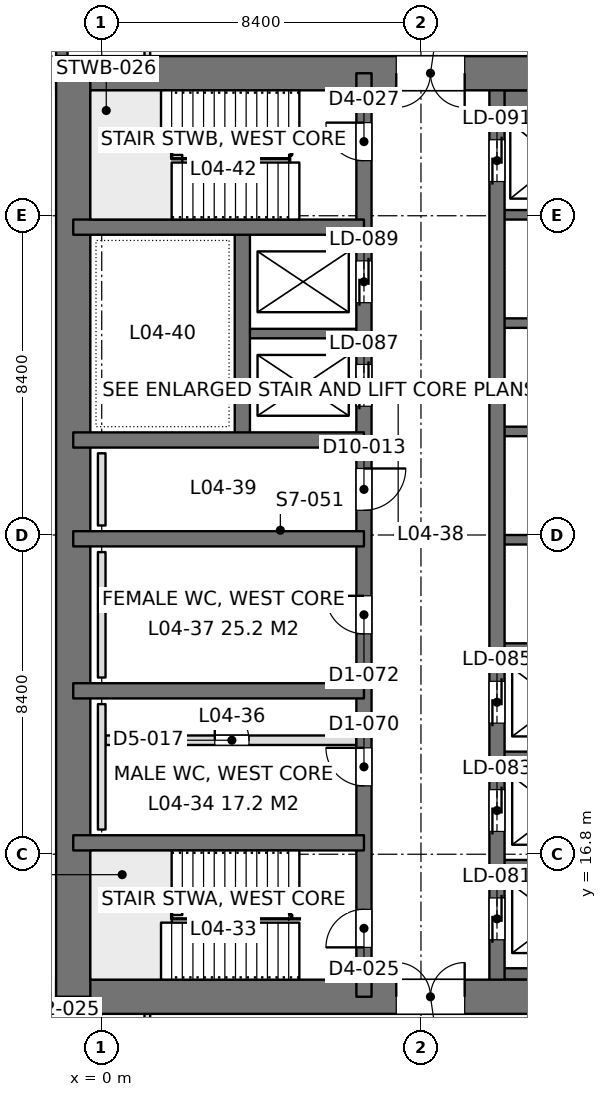
"""IFC4 building model, lengths in metres.
Left out: names, types, materials, properties, quantities, classifications, styles, units other than length and angle.
Written with IfcOpenShell. Run it as: python <this file> out.ifc"""

import sys

from ifc_helpers import new_model, si_unit, direction, frame, frame_2d, origin, place, context, subcontext, project, spatial, rectangle, extrude, element, fill, save


model = new_model("IFC4")
c1 = context("Model", 3, precision=1e-05, world=origin(), true_north=direction((0.0, 1.0)))
c2 = subcontext(c1, "Body", "Model", "MODEL_VIEW")
j1 = project(units=[si_unit("LENGTHUNIT", "METRE"), si_unit("PLANEANGLEUNIT", "RADIAN")], contexts=[c1])
p1 = place(None, origin())
s1 = spatial("IfcSite", under=j1, at=p1, CompositionType="ELEMENT")
p2 = place(p1, origin())
s2 = spatial("IfcBuilding", under=s1, at=p2, CompositionType="ELEMENT")
p3 = place(p2, frame((0.0, 0.0, 18.9)))
s3 = spatial("IfcBuildingStorey", under=s2, at=p3, CompositionType="ELEMENT", Elevation=18.9)
p4 = place(p3, frame((-1.2, 13.05, 0.0), z_axis=(0.0, 0.0, 1.0), x_axis=(1.0, 0.0, 0.0)))
e1 = element("IfcWall", 1, at=p4, inside=s3, PredefinedType="SHEAR", context=c2, shape_type="SweptSolid", body=[
    extrude(rectangle(XDim=18.0, YDim=0.9, at=frame_2d((9.0, 0.0))), origin(), (0.0, 0.0, 1.0), 4.5),
])
p5 = place(p4, frame((8.95, 0.0, 0.0)))
e2 = element("IfcOpeningElement", 2, at=p5, cuts=e1, PredefinedType="OPENING", context=c2, shape_type="SweptSolid", body=[
    extrude(rectangle(XDim=1.8, YDim=2.4, at=frame_2d((0.9, 1.2))), frame((0.0, 0.46, 0.0), z_axis=(0.0, -1.0, 0.0), x_axis=(1.0, 0.0, 0.0)), (0.0, 0.0, 1.0), 0.92),
])
p6 = place(p3, frame((-1.2, 37.35, 0.0), z_axis=(0.0, 0.0, 1.0), x_axis=(1.0, 0.0, 0.0)))
e3 = element("IfcWall", 3, at=p6, inside=s3, PredefinedType="SHEAR", context=c2, shape_type="SweptSolid", body=[
    extrude(rectangle(XDim=18.0, YDim=0.9, at=frame_2d((9.0, 0.0))), origin(), (0.0, 0.0, 1.0), 4.5),
])
p7 = place(p6, frame((8.95, 0.0, 0.0)))
e4 = element("IfcOpeningElement", 4, at=p7, cuts=e3, PredefinedType="OPENING", context=c2, shape_type="SweptSolid", body=[
    extrude(rectangle(XDim=1.8, YDim=2.4, at=frame_2d((0.9, 1.2))), frame((0.0, 0.46, 0.0), z_axis=(0.0, -1.0, 0.0), x_axis=(1.0, 0.0, 0.0)), (0.0, 0.0, 1.0), 0.92),
])
p8 = place(p3, frame((-0.75, 13.05, 0.0), z_axis=(0.0, 0.0, 1.0), x_axis=(0.0, 1.0, 0.0)))
e5 = element("IfcWall", 5, at=p8, inside=s3, PredefinedType="SHEAR", context=c2, shape_type="SweptSolid", body=[
    extrude(rectangle(XDim=24.3, YDim=0.9, at=frame_2d((12.15, 0.0))), origin(), (0.0, 0.0, 1.0), 4.5),
])
p9 = place(p3, frame((6.9, 13.05, 0.0), z_axis=(0.0, 0.0, 1.0), x_axis=(0.0, 1.0, 0.0)))
e6 = element("IfcWall", 6, at=p9, inside=s3, PredefinedType="SHEAR", context=c2, shape_type="SweptSolid", body=[
    extrude(rectangle(XDim=24.3, YDim=0.4, at=frame_2d((12.15, 0.0))), origin(), (0.0, 0.0, 1.0), 4.5),
])
p10 = place(p9, frame((1.3, 0.0, 0.0)))
e7 = element("IfcOpeningElement", 7, at=p10, cuts=e6, PredefinedType="OPENING", context=c2, shape_type="SweptSolid", body=[
    extrude(rectangle(XDim=1.0, YDim=2.2, at=frame_2d((0.5, 1.1))), frame((0.0, 0.21, 0.0), z_axis=(0.0, -1.0, 0.0), x_axis=(1.0, 0.0, 0.0)), (0.0, 0.0, 1.0), 0.42),
])
p11 = place(p9, frame((22.0, 0.0, 0.0)))
e8 = element("IfcOpeningElement", 8, at=p11, cuts=e6, PredefinedType="OPENING", context=c2, shape_type="SweptSolid", body=[
    extrude(rectangle(XDim=1.0, YDim=2.2, at=frame_2d((0.5, 1.1))), frame((0.0, 0.21, 0.0), z_axis=(0.0, -1.0, 0.0), x_axis=(1.0, 0.0, 0.0)), (0.0, 0.0, 1.0), 0.42),
])
p12 = place(p9, frame((5.55, 0.0, 0.0)))
e9 = element("IfcOpeningElement", 9, at=p12, cuts=e6, PredefinedType="OPENING", context=c2, shape_type="SweptSolid", body=[
    extrude(rectangle(XDim=1.0, YDim=2.2, at=frame_2d((0.5, 1.1))), frame((0.0, 0.21, 0.0), z_axis=(0.0, -1.0, 0.0), x_axis=(1.0, 0.0, 0.0)), (0.0, 0.0, 1.0), 0.42),
])
p13 = place(p9, frame((9.55, 0.0, 0.0)))
e10 = element("IfcOpeningElement", 10, at=p13, cuts=e6, PredefinedType="OPENING", context=c2, shape_type="SweptSolid", body=[
    extrude(rectangle(XDim=1.0, YDim=2.2, at=frame_2d((0.5, 1.1))), frame((0.0, 0.21, 0.0), z_axis=(0.0, -1.0, 0.0), x_axis=(1.0, 0.0, 0.0)), (0.0, 0.0, 1.0), 0.42),
])
p14 = place(p9, frame((12.8, 0.0, 0.0)))
e11 = element("IfcOpeningElement", 11, at=p14, cuts=e6, PredefinedType="OPENING", context=c2, shape_type="SweptSolid", body=[
    extrude(rectangle(XDim=1.1, YDim=2.2, at=frame_2d((0.55, 1.1))), frame((0.0, 0.21, 0.0), z_axis=(0.0, -1.0, 0.0), x_axis=(1.0, 0.0, 0.0)), (0.0, 0.0, 1.0), 0.42),
])
p15 = place(p9, frame((15.538, 0.0, 0.0)))
e12 = element("IfcOpeningElement", 12, at=p15, cuts=e6, PredefinedType="OPENING", context=c2, shape_type="SweptSolid", body=[
    extrude(rectangle(XDim=1.1, YDim=2.2, at=frame_2d((0.55, 1.1))), frame((0.0, 0.21, 0.0), z_axis=(0.0, -1.0, 0.0), x_axis=(1.0, 0.0, 0.0)), (0.0, 0.0, 1.0), 0.42),
])
p16 = place(p9, frame((18.262, 0.0, 0.0)))
e13 = element("IfcOpeningElement", 13, at=p16, cuts=e6, PredefinedType="OPENING", context=c2, shape_type="SweptSolid", body=[
    extrude(rectangle(XDim=1.1, YDim=2.2, at=frame_2d((0.55, 1.1))), frame((0.0, 0.21, 0.0), z_axis=(0.0, -1.0, 0.0), x_axis=(1.0, 0.0, 0.0)), (0.0, 0.0, 1.0), 0.42),
])
p17 = place(p3, frame((10.4, 13.05, 0.0), z_axis=(0.0, 0.0, 1.0), x_axis=(0.0, 1.0, 0.0)))
e14 = element("IfcWall", 14, at=p17, inside=s3, PredefinedType="SHEAR", context=c2, shape_type="SweptSolid", body=[
    extrude(rectangle(XDim=24.3, YDim=0.4, at=frame_2d((12.15, 0.0))), origin(), (0.0, 0.0, 1.0), 4.5),
])
p18 = place(p17, frame((1.5, 0.0, 0.0)))
e15 = element("IfcOpeningElement", 15, at=p18, cuts=e14, PredefinedType="OPENING", context=c2, shape_type="SweptSolid", body=[
    extrude(rectangle(XDim=1.1, YDim=2.2, at=frame_2d((0.55, 1.1))), frame((0.0, 0.21, 0.0), z_axis=(0.0, -1.0, 0.0), x_axis=(1.0, 0.0, 0.0)), (0.0, 0.0, 1.0), 0.42),
])
p19 = place(p17, frame((4.35, 0.0, 0.0)))
e16 = element("IfcOpeningElement", 16, at=p19, cuts=e14, PredefinedType="OPENING", context=c2, shape_type="SweptSolid", body=[
    extrude(rectangle(XDim=1.1, YDim=2.2, at=frame_2d((0.55, 1.1))), frame((0.0, 0.21, 0.0), z_axis=(0.0, -1.0, 0.0), x_axis=(1.0, 0.0, 0.0)), (0.0, 0.0, 1.0), 0.42),
])
p20 = place(p17, frame((7.2, 0.0, 0.0)))
e17 = element("IfcOpeningElement", 17, at=p20, cuts=e14, PredefinedType="OPENING", context=c2, shape_type="SweptSolid", body=[
    extrude(rectangle(XDim=1.1, YDim=2.2, at=frame_2d((0.55, 1.1))), frame((0.0, 0.21, 0.0), z_axis=(0.0, -1.0, 0.0), x_axis=(1.0, 0.0, 0.0)), (0.0, 0.0, 1.0), 0.42),
])
p21 = place(p17, frame((21.45, 0.0, 0.0)))
e18 = element("IfcOpeningElement", 18, at=p21, cuts=e14, PredefinedType="OPENING", context=c2, shape_type="SweptSolid", body=[
    extrude(rectangle(XDim=1.1, YDim=2.2, at=frame_2d((0.55, 1.1))), frame((0.0, 0.21, 0.0), z_axis=(0.0, -1.0, 0.0), x_axis=(1.0, 0.0, 0.0)), (0.0, 0.0, 1.0), 0.42),
])
for number, where, z_axis, x_axis in (
    (19, (-0.75, 17.1, 0.0), (0.0, 0.0, 1.0), (1.0, 0.0, 0.0)),
    (20, (-0.75, 21.1, 0.0), (0.0, 0.0, 1.0), (1.0, 0.0, 0.0)),
    (21, (-0.75, 25.1, 0.0), (0.0, 0.0, 1.0), (1.0, 0.0, 0.0)),
    (22, (-0.75, 27.7, 0.0), (0.0, 0.0, 1.0), (1.0, 0.0, 0.0)),
    (23, (-0.75, 33.3, 0.0), (0.0, 0.0, 1.0), (1.0, 0.0, 0.0)),
):
    element("IfcWall", number, at=place(p3, frame(where, z_axis=z_axis, x_axis=x_axis)), inside=s3, PredefinedType="SHEAR", context=c2, shape_type="SweptSolid", body=[
        extrude(rectangle(XDim=7.65, YDim=0.4, at=frame_2d((3.825, 0.0))), origin(), (0.0, 0.0, 1.0), 4.5),
    ])
p22 = place(p3, frame((3.7, 27.7, 0.0), z_axis=(0.0, 0.0, 1.0), x_axis=(0.0, 1.0, 0.0)))
e24 = element("IfcWall", 24, at=p22, inside=s3, PredefinedType="SHEAR", context=c2, shape_type="SweptSolid", body=[
    extrude(rectangle(XDim=5.6, YDim=0.4, at=frame_2d((2.8, 0.0))), origin(), (0.0, 0.0, 1.0), 4.5),
])
p23 = place(p3, frame((3.7, 30.5, 0.0), z_axis=(0.0, 0.0, 1.0), x_axis=(1.0, 0.0, 0.0)))
e25 = element("IfcWall", 25, at=p23, inside=s3, PredefinedType="SHEAR", context=c2, shape_type="SweptSolid", body=[
    extrude(rectangle(XDim=3.2, YDim=0.25, at=frame_2d((1.6, 0.0))), origin(), (0.0, 0.0, 1.0), 4.5),
])
p24 = place(p3, frame((10.4, 13.65, 0.0), z_axis=(0.0, 0.0, 1.0), x_axis=(1.0, 0.0, 0.0)))
e26 = element("IfcWall", 26, at=p24, inside=s3, PredefinedType="SHEAR", context=c2, shape_type="SweptSolid", body=[
    extrude(rectangle(XDim=3.2, YDim=0.3, at=frame_2d((1.6, 0.0))), origin(), (0.0, 0.0, 1.0), 4.5),
])
for number, where, z_axis, x_axis in (
    (27, (10.4, 16.525, 0.0), (0.0, 0.0, 1.0), (1.0, 0.0, 0.0)),
    (28, (10.4, 19.375, 0.0), (0.0, 0.0, 1.0), (1.0, 0.0, 0.0)),
    (29, (10.4, 22.225, 0.0), (0.0, 0.0, 1.0), (1.0, 0.0, 0.0)),
    (30, (10.4, 25.075, 0.0), (0.0, 0.0, 1.0), (1.0, 0.0, 0.0)),
    (31, (10.4, 27.925, 0.0), (0.0, 0.0, 1.0), (1.0, 0.0, 0.0)),
    (32, (10.4, 30.775, 0.0), (0.0, 0.0, 1.0), (1.0, 0.0, 0.0)),
    (33, (10.4, 33.625, 0.0), (0.0, 0.0, 1.0), (1.0, 0.0, 0.0)),
):
    element("IfcWall", number, at=place(p3, frame(where, z_axis=z_axis, x_axis=x_axis)), inside=s3, PredefinedType="SHEAR", context=c2, shape_type="SweptSolid", body=[
        extrude(rectangle(XDim=3.2, YDim=0.25, at=frame_2d((1.6, 0.0))), origin(), (0.0, 0.0, 1.0), 4.5),
    ])
p25 = place(p3, frame((10.4, 36.625, 0.0), z_axis=(0.0, 0.0, 1.0), x_axis=(1.0, 0.0, 0.0)))
e34 = element("IfcWall", 34, at=p25, inside=s3, PredefinedType="SHEAR", context=c2, shape_type="SweptSolid", body=[
    extrude(rectangle(XDim=3.2, YDim=0.55, at=frame_2d((1.6, 0.0))), origin(), (0.0, 0.0, 1.0), 4.5),
])
p26 = place(p3, frame((-1.05, 8.4, 0.0), z_axis=(0.0, 0.0, 1.0), x_axis=(0.0, 1.0, 0.0)))
e35 = element("IfcWall", 35, at=p26, inside=s3, PredefinedType="SOLIDWALL", context=c2, shape_type="SweptSolid", body=[
    extrude(rectangle(XDim=4.2, YDim=0.3, at=frame_2d((2.1, 0.0))), origin(), (0.0, 0.0, 1.0), 4.34),
])
p27 = place(p26, frame((0.9, 0.0, 0.9)))
e36 = element("IfcOpeningElement", 36, at=p27, cuts=e35, PredefinedType="OPENING", context=c2, shape_type="SweptSolid", body=[
    extrude(rectangle(XDim=2.4, YDim=1.9, at=frame_2d((1.2, 0.95))), frame((0.0, 0.16, 0.0), z_axis=(0.0, -1.0, 0.0), x_axis=(1.0, 0.0, 0.0)), (0.0, 0.0, 1.0), 0.32),
])
p28 = place(p3, frame((-1.05, 37.8, 0.0), z_axis=(0.0, 0.0, 1.0), x_axis=(0.0, 1.0, 0.0)))
e37 = element("IfcWall", 37, at=p28, inside=s3, PredefinedType="SOLIDWALL", context=c2, shape_type="SweptSolid", body=[
    extrude(rectangle(XDim=4.2, YDim=0.3, at=frame_2d((2.1, 0.0))), origin(), (0.0, 0.0, 1.0), 4.34),
])
p29 = place(p28, frame((0.9, 0.0, 0.9)))
e38 = element("IfcOpeningElement", 38, at=p29, cuts=e37, PredefinedType="OPENING", context=c2, shape_type="SweptSolid", body=[
    extrude(rectangle(XDim=2.4, YDim=1.9, at=frame_2d((1.2, 0.95))), frame((0.0, 0.16, 0.0), z_axis=(0.0, -1.0, 0.0), x_axis=(1.0, 0.0, 0.0)), (0.0, 0.0, 1.0), 0.32),
])
p30 = place(p3, frame((1.2, 10.8, 0.0), z_axis=(0.0, 0.0, 1.0), x_axis=(0.0, 1.0, 0.0)))
e39 = element("IfcWall", 39, at=p30, inside=s3, PredefinedType="PARTITIONING", context=c2, shape_type="SweptSolid", body=[
    extrude(rectangle(XDim=1.802, YDim=0.15, at=frame_2d((0.901, 0.0))), origin(), (0.0, 0.0, 1.0), 4.34),
])
p31 = place(p3, frame((1.2, 37.8, 0.0), z_axis=(0.0, 0.0, 1.0), x_axis=(0.0, 1.0, 0.0)))
e40 = element("IfcWall", 40, at=p31, inside=s3, PredefinedType="PARTITIONING", context=c2, shape_type="SweptSolid", body=[
    extrude(rectangle(XDim=1.8, YDim=0.15, at=frame_2d((0.9, 0.0))), origin(), (0.0, 0.0, 1.0), 4.34),
])
p32 = place(p3, frame((0.1, 19.8, 0.0), z_axis=(0.0, 0.0, 1.0), x_axis=(1.0, 0.0, 0.0)))
e41 = element("IfcWall", 41, at=p32, inside=s3, PredefinedType="PARTITIONING", context=c2, shape_type="SweptSolid", body=[
    extrude(rectangle(XDim=6.6, YDim=0.25, at=frame_2d((3.3, 0.0))), origin(), (0.0, 0.0, 1.0), 4.3),
])
p33 = place(p32, frame((2.875, 0.0, 0.0)))
e42 = element("IfcOpeningElement", 42, at=p33, cuts=e41, PredefinedType="OPENING", context=c2, shape_type="SweptSolid", body=[
    extrude(rectangle(XDim=0.9, YDim=2.2, at=frame_2d((0.45, 1.1))), frame((0.0, 0.135, 0.0), z_axis=(0.0, -1.0, 0.0), x_axis=(1.0, 0.0, 0.0)), (0.0, 0.0, 1.0), 0.27),
])
for number, where, z_axis, x_axis in (
    (43, (0.0, 17.45, 0.0), (0.0, 0.0, 1.0), (0.0, 1.0, 0.0)),
    (44, (0.0, 21.45, 0.0), (0.0, 0.0, 1.0), (0.0, 1.0, 0.0)),
):
    element("IfcWall", number, at=place(p3, frame(where, z_axis=z_axis, x_axis=x_axis)), inside=s3, PredefinedType="PLUMBINGWALL", context=c2, shape_type="SweptSolid", body=[
        extrude(rectangle(XDim=3.3, YDim=0.2, at=frame_2d((1.65, 0.0))), origin(), (0.0, 0.0, 1.0), 1.2),
    ])
p34 = place(p3, frame((0.0, 25.45, 0.0), z_axis=(0.0, 0.0, 1.0), x_axis=(0.0, 1.0, 0.0)))
e45 = element("IfcWall", 45, at=p34, inside=s3, PredefinedType="PLUMBINGWALL", context=c2, shape_type="SweptSolid", body=[
    extrude(rectangle(XDim=1.9, YDim=0.2, at=frame_2d((0.95, 0.0))), origin(), (0.0, 0.0, 1.0), 1.2),
])
p35 = place(p5, origin())
e46 = element("IfcDoor", 46, at=p35, inside=s3, OperationType="DOUBLE_DOOR_SINGLE_SWING", PredefinedType="DOOR", context=c2, shape_type="SweptSolid", body=[
    extrude(rectangle(XDim=1.8, YDim=2.4, at=frame_2d((0.9, 1.2))), frame((0.0, 0.025, 0.0), z_axis=(0.0, -1.0, 0.0), x_axis=(1.0, 0.0, 0.0)), (0.0, 0.0, 1.0), 0.05),
])
fill(e2, e46)
p36 = place(p7, frame((1.8, 0.0, 0.0), z_axis=(0.0, 0.0, 1.0), x_axis=(-1.0, 0.0, 0.0)))
e47 = element("IfcDoor", 47, at=p36, inside=s3, OperationType="DOUBLE_DOOR_SINGLE_SWING", PredefinedType="DOOR", context=c2, shape_type="SweptSolid", body=[
    extrude(rectangle(XDim=1.8, YDim=2.4, at=frame_2d((0.9, 1.2))), frame((0.0, 0.025, 0.0), z_axis=(0.0, -1.0, 0.0), x_axis=(1.0, 0.0, 0.0)), (0.0, 0.0, 1.0), 0.05),
])
fill(e4, e47)
p37 = place(p10, origin())
e48 = element("IfcDoor", 48, at=p37, inside=s3, OperationType="SINGLE_SWING_LEFT", PredefinedType="DOOR", context=c2, shape_type="SweptSolid", body=[
    extrude(rectangle(XDim=1.0, YDim=2.2, at=frame_2d((0.5, 1.1))), frame((0.0, 0.025, 0.0), z_axis=(0.0, -1.0, 0.0), x_axis=(1.0, 0.0, 0.0)), (0.0, 0.0, 1.0), 0.05),
])
fill(e7, e48)
p38 = place(p11, origin())
e49 = element("IfcDoor", 49, at=p38, inside=s3, OperationType="SINGLE_SWING_RIGHT", PredefinedType="DOOR", context=c2, shape_type="SweptSolid", body=[
    extrude(rectangle(XDim=1.0, YDim=2.2, at=frame_2d((0.5, 1.1))), frame((0.0, 0.025, 0.0), z_axis=(0.0, -1.0, 0.0), x_axis=(1.0, 0.0, 0.0)), (0.0, 0.0, 1.0), 0.05),
])
fill(e8, e49)
p39 = place(p12, origin())
e50 = element("IfcDoor", 50, at=p39, inside=s3, OperationType="SINGLE_SWING_RIGHT", PredefinedType="DOOR", context=c2, shape_type="SweptSolid", body=[
    extrude(rectangle(XDim=1.0, YDim=2.2, at=frame_2d((0.5, 1.1))), frame((0.0, 0.025, 0.0), z_axis=(0.0, -1.0, 0.0), x_axis=(1.0, 0.0, 0.0)), (0.0, 0.0, 1.0), 0.05),
])
fill(e9, e50)
p40 = place(p13, origin())
e51 = element("IfcDoor", 51, at=p40, inside=s3, OperationType="SINGLE_SWING_RIGHT", PredefinedType="DOOR", context=c2, shape_type="SweptSolid", body=[
    extrude(rectangle(XDim=1.0, YDim=2.2, at=frame_2d((0.5, 1.1))), frame((0.0, 0.025, 0.0), z_axis=(0.0, -1.0, 0.0), x_axis=(1.0, 0.0, 0.0)), (0.0, 0.0, 1.0), 0.05),
])
fill(e10, e51)
p41 = place(p14, frame((1.1, 0.0, 0.0), z_axis=(0.0, 0.0, 1.0), x_axis=(-1.0, 0.0, 0.0)))
e52 = element("IfcDoor", 52, at=p41, inside=s3, OperationType="SINGLE_SWING_LEFT", PredefinedType="DOOR", context=c2, shape_type="SweptSolid", body=[
    extrude(rectangle(XDim=1.1, YDim=2.2, at=frame_2d((0.55, 1.1))), frame((0.0, 0.025, 0.0), z_axis=(0.0, -1.0, 0.0), x_axis=(1.0, 0.0, 0.0)), (0.0, 0.0, 1.0), 0.05),
])
fill(e11, e52)
p42 = place(p18, origin())
e53 = element("IfcDoor", 53, at=p42, inside=s3, OperationType="DOUBLE_DOOR_SLIDING", PredefinedType="DOOR", context=c2, shape_type="SweptSolid", body=[
    extrude(rectangle(XDim=1.1, YDim=2.2, at=frame_2d((0.55, 1.1))), frame((0.0, 0.025, 0.0), z_axis=(0.0, -1.0, 0.0), x_axis=(1.0, 0.0, 0.0)), (0.0, 0.0, 1.0), 0.05),
])
fill(e15, e53)
p43 = place(p19, origin())
e54 = element("IfcDoor", 54, at=p43, inside=s3, OperationType="DOUBLE_DOOR_SLIDING", PredefinedType="DOOR", context=c2, shape_type="SweptSolid", body=[
    extrude(rectangle(XDim=1.1, YDim=2.2, at=frame_2d((0.55, 1.1))), frame((0.0, 0.025, 0.0), z_axis=(0.0, -1.0, 0.0), x_axis=(1.0, 0.0, 0.0)), (0.0, 0.0, 1.0), 0.05),
])
fill(e16, e54)
p44 = place(p20, origin())
e55 = element("IfcDoor", 55, at=p44, inside=s3, OperationType="DOUBLE_DOOR_SLIDING", PredefinedType="DOOR", context=c2, shape_type="SweptSolid", body=[
    extrude(rectangle(XDim=1.1, YDim=2.2, at=frame_2d((0.55, 1.1))), frame((0.0, 0.025, 0.0), z_axis=(0.0, -1.0, 0.0), x_axis=(1.0, 0.0, 0.0)), (0.0, 0.0, 1.0), 0.05),
])
fill(e17, e55)
p45 = place(p21, origin())
e56 = element("IfcDoor", 56, at=p45, inside=s3, OperationType="DOUBLE_DOOR_SLIDING", PredefinedType="DOOR", context=c2, shape_type="SweptSolid", body=[
    extrude(rectangle(XDim=1.1, YDim=2.2, at=frame_2d((0.55, 1.1))), frame((0.0, 0.025, 0.0), z_axis=(0.0, -1.0, 0.0), x_axis=(1.0, 0.0, 0.0)), (0.0, 0.0, 1.0), 0.05),
])
fill(e18, e56)
p46 = place(p15, origin())
e57 = element("IfcDoor", 57, at=p46, inside=s3, OperationType="DOUBLE_DOOR_SLIDING", PredefinedType="DOOR", context=c2, shape_type="SweptSolid", body=[
    extrude(rectangle(XDim=1.1, YDim=2.2, at=frame_2d((0.55, 1.1))), frame((0.0, 0.025, 0.0), z_axis=(0.0, -1.0, 0.0), x_axis=(1.0, 0.0, 0.0)), (0.0, 0.0, 1.0), 0.05),
])
fill(e12, e57)
p47 = place(p16, origin())
e58 = element("IfcDoor", 58, at=p47, inside=s3, OperationType="DOUBLE_DOOR_SLIDING", PredefinedType="DOOR", context=c2, shape_type="SweptSolid", body=[
    extrude(rectangle(XDim=1.1, YDim=2.2, at=frame_2d((0.55, 1.1))), frame((0.0, 0.025, 0.0), z_axis=(0.0, -1.0, 0.0), x_axis=(1.0, 0.0, 0.0)), (0.0, 0.0, 1.0), 0.05),
])
fill(e13, e58)
p48 = place(p33, origin())
e59 = element("IfcDoor", 59, at=p48, inside=s3, OperationType="SINGLE_SWING_LEFT", PredefinedType="DOOR", context=c2, shape_type="SweptSolid", body=[
    extrude(rectangle(XDim=0.9, YDim=2.2, at=frame_2d((0.45, 1.1))), frame((0.0, 0.025, 0.0), z_axis=(0.0, -1.0, 0.0), x_axis=(1.0, 0.0, 0.0)), (0.0, 0.0, 1.0), 0.05),
])
fill(e42, e59)
save(model, sys.argv[1])
